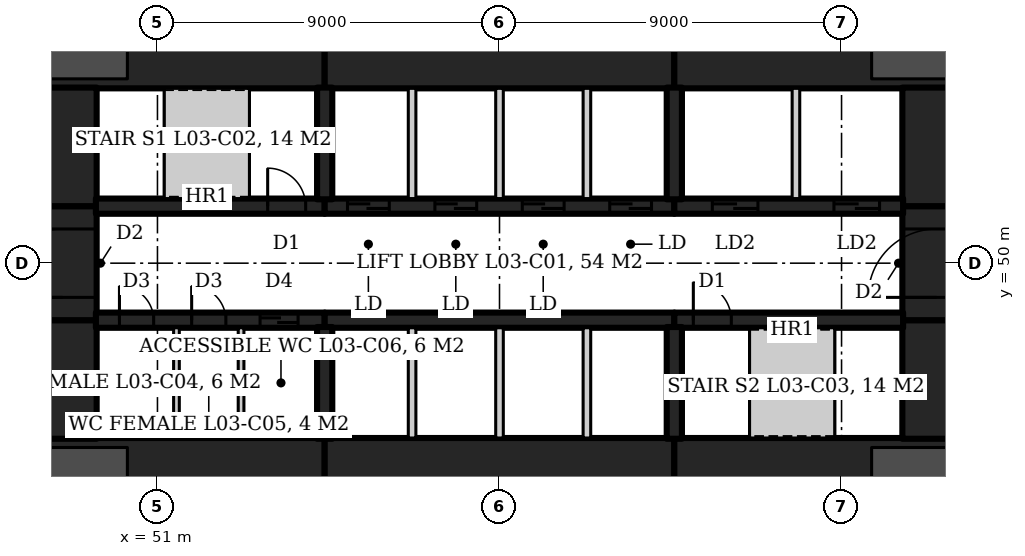
"""IFC4 building model, lengths in metres.
Left out: names, types, materials, properties, quantities, classifications, styles, units other than length and angle.
Written with IfcOpenShell. Run it as: python <this file> out.ifc"""

import sys

from ifc_helpers import new_model, si_unit, direction, frame, frame_2d, origin, origin_2d, place, context, subcontext, project, spatial, rectangle, circle, extrude, element, fill, save


model = new_model("IFC4")
c1 = context("Model", 3, precision=1e-05, world=origin(), true_north=direction((0.0, 1.0)))
c2 = subcontext(c1, "Body", "Model", "MODEL_VIEW")
j1 = project(units=[si_unit("LENGTHUNIT", "METRE"), si_unit("PLANEANGLEUNIT", "RADIAN")], contexts=[c1])
p1 = place(None, origin())
s1 = spatial("IfcSite", under=j1, at=p1, CompositionType="ELEMENT")
p2 = place(p1, origin())
s2 = spatial("IfcBuilding", under=s1, at=p2, CompositionType="ELEMENT")
p3 = place(p2, frame((0.0, 0.0, 20.0)))
s3 = spatial("IfcBuildingStorey", under=s2, at=p3, CompositionType="ELEMENT", Elevation=20.0)
for number, where, z_axis, x_axis in (
    (1, (71.691, 56.75, 0.0), (0.0, 0.0, 1.0), (1.0, 0.0, 0.0)),
    (2, (48.309, 56.75, 0.0), (0.0, 0.0, 1.0), (1.0, 0.0, 0.0)),
    (3, (48.309, 43.25, 0.0), (0.0, 0.0, 1.0), (1.0, 0.0, 0.0)),
    (4, (71.691, 43.25, 0.0), (0.0, 0.0, 1.0), (1.0, 0.0, 0.0)),
):
    element("IfcColumn", number, at=place(p3, frame(where, z_axis=z_axis, x_axis=x_axis)), inside=s3, PredefinedType="COLUMN", context=c2, shape_type="SweptSolid", body=[
        extrude(circle(Radius=1.9, at=origin_2d()), origin(), (0.0, 0.0, 1.0), 5.84),
    ])
p4 = place(p3, frame((47.6, 55.5, 0.0), z_axis=(0.0, 0.0, 1.0), x_axis=(1.0, 0.0, 0.0)))
e5 = element("IfcWall", 5, at=p4, inside=s3, PredefinedType="SHEAR", context=c2, shape_type="SweptSolid", body=[
    extrude(rectangle(XDim=7.8, YDim=1.8, at=frame_2d((3.9, 0.0))), origin(), (0.0, 0.0, 1.0), 6.0),
])
p5 = place(p3, frame((55.4, 55.5, 0.0), z_axis=(0.0, 0.0, 1.0), x_axis=(1.0, 0.0, 0.0)))
e6 = element("IfcWall", 6, at=p5, inside=s3, PredefinedType="SHEAR", context=c2, shape_type="SweptSolid", body=[
    extrude(rectangle(XDim=9.2, YDim=1.8, at=frame_2d((4.6, 0.0))), origin(), (0.0, 0.0, 1.0), 6.0),
])
for number, where, z_axis, x_axis in (
    (7, (64.6, 55.5, 0.0), (0.0, 0.0, 1.0), (1.0, 0.0, 0.0)),
    (8, (47.6, 44.5, 0.0), (0.0, 0.0, 1.0), (1.0, 0.0, 0.0)),
):
    element("IfcWall", number, at=place(p3, frame(where, z_axis=z_axis, x_axis=x_axis)), inside=s3, PredefinedType="SHEAR", context=c2, shape_type="SweptSolid", body=[
        extrude(rectangle(XDim=7.8, YDim=1.8, at=frame_2d((3.9, 0.0))), origin(), (0.0, 0.0, 1.0), 6.0),
    ])
p6 = place(p3, frame((55.4, 44.5, 0.0), z_axis=(0.0, 0.0, 1.0), x_axis=(1.0, 0.0, 0.0)))
e9 = element("IfcWall", 9, at=p6, inside=s3, PredefinedType="SHEAR", context=c2, shape_type="SweptSolid", body=[
    extrude(rectangle(XDim=9.2, YDim=1.8, at=frame_2d((4.6, 0.0))), origin(), (0.0, 0.0, 1.0), 6.0),
])
p7 = place(p3, frame((64.6, 44.5, 0.0), z_axis=(0.0, 0.0, 1.0), x_axis=(1.0, 0.0, 0.0)))
e10 = element("IfcWall", 10, at=p7, inside=s3, PredefinedType="SHEAR", context=c2, shape_type="SweptSolid", body=[
    extrude(rectangle(XDim=7.8, YDim=1.8, at=frame_2d((3.9, 0.0))), origin(), (0.0, 0.0, 1.0), 6.0),
])
p8 = place(p3, frame((71.5, 45.38, 0.0), z_axis=(0.0, 0.0, 1.0), x_axis=(0.0, 1.0, 0.0)))
e11 = element("IfcWall", 11, at=p8, inside=s3, PredefinedType="SHEAR", context=c2, shape_type="SweptSolid", body=[
    extrude(rectangle(XDim=3.12, YDim=1.8, at=frame_2d((1.56, 0.0))), origin(), (0.0, 0.0, 1.0), 6.0),
])
p9 = place(p3, frame((71.5, 48.5, 0.0), z_axis=(0.0, 0.0, 1.0), x_axis=(0.0, 1.0, 0.0)))
e12 = element("IfcWall", 12, at=p9, inside=s3, PredefinedType="SHEAR", context=c2, shape_type="SweptSolid", body=[
    extrude(rectangle(XDim=3.0, YDim=1.8, at=frame_2d((1.5, 0.0))), origin(), (0.0, 0.0, 1.0), 6.0),
])
p10 = place(p9, frame((0.6, 0.0, 0.0)))
e13 = element("IfcOpeningElement", 13, at=p10, cuts=e12, PredefinedType="OPENING", context=c2, shape_type="SweptSolid", body=[
    extrude(rectangle(XDim=1.8, YDim=2.1, at=frame_2d((0.9, 1.05))), frame((0.0, 0.91, 0.0), z_axis=(0.0, -1.0, 0.0), x_axis=(1.0, 0.0, 0.0)), (0.0, 0.0, 1.0), 1.82),
])
for number, where, z_axis, x_axis in (
    (14, (71.5, 51.5, 0.0), (0.0, 0.0, 1.0), (0.0, 1.0, 0.0)),
    (15, (48.5, 45.38, 0.0), (0.0, 0.0, 1.0), (0.0, 1.0, 0.0)),
):
    element("IfcWall", number, at=place(p3, frame(where, z_axis=z_axis, x_axis=x_axis)), inside=s3, PredefinedType="SHEAR", context=c2, shape_type="SweptSolid", body=[
        extrude(rectangle(XDim=3.12, YDim=1.8, at=frame_2d((1.56, 0.0))), origin(), (0.0, 0.0, 1.0), 6.0),
    ])
p11 = place(p3, frame((48.5, 48.5, 0.0), z_axis=(0.0, 0.0, 1.0), x_axis=(0.0, 1.0, 0.0)))
e16 = element("IfcWall", 16, at=p11, inside=s3, PredefinedType="SHEAR", context=c2, shape_type="SweptSolid", body=[
    extrude(rectangle(XDim=3.0, YDim=1.8, at=frame_2d((1.5, 0.0))), origin(), (0.0, 0.0, 1.0), 6.0),
])
p12 = place(p11, frame((0.6, 0.0, 0.0)))
e17 = element("IfcOpeningElement", 17, at=p12, cuts=e16, PredefinedType="OPENING", context=c2, shape_type="SweptSolid", body=[
    extrude(rectangle(XDim=1.8, YDim=2.1, at=frame_2d((0.9, 1.05))), frame((0.0, 0.91, 0.0), z_axis=(0.0, -1.0, 0.0), x_axis=(1.0, 0.0, 0.0)), (0.0, 0.0, 1.0), 1.82),
])
p13 = place(p3, frame((48.5, 51.5, 0.0), z_axis=(0.0, 0.0, 1.0), x_axis=(0.0, 1.0, 0.0)))
e18 = element("IfcWall", 18, at=p13, inside=s3, PredefinedType="SHEAR", context=c2, shape_type="SweptSolid", body=[
    extrude(rectangle(XDim=3.12, YDim=1.8, at=frame_2d((1.56, 0.0))), origin(), (0.0, 0.0, 1.0), 6.0),
])
p14 = place(p3, frame((49.38, 51.5, 0.0), z_axis=(0.0, 0.0, 1.0), x_axis=(1.0, 0.0, 0.0)))
e19 = element("IfcWall", 19, at=p14, inside=s3, PredefinedType="SHEAR", context=c2, shape_type="SweptSolid", body=[
    extrude(rectangle(XDim=6.02, YDim=0.4, at=frame_2d((3.01, 0.0))), origin(), (0.0, 0.0, 1.0), 6.0),
])
p15 = place(p14, frame((4.52, 0.0, 0.0)))
e20 = element("IfcOpeningElement", 20, at=p15, cuts=e19, PredefinedType="OPENING", context=c2, shape_type="SweptSolid", body=[
    extrude(rectangle(XDim=1.0, YDim=2.1, at=frame_2d((0.5, 1.05))), frame((0.0, 0.21, 0.0), z_axis=(0.0, -1.0, 0.0), x_axis=(1.0, 0.0, 0.0)), (0.0, 0.0, 1.0), 0.42),
])
p16 = place(p3, frame((55.4, 51.5, 0.0), z_axis=(0.0, 0.0, 1.0), x_axis=(1.0, 0.0, 0.0)))
e21 = element("IfcWall", 21, at=p16, inside=s3, PredefinedType="SHEAR", context=c2, shape_type="SweptSolid", body=[
    extrude(rectangle(XDim=9.2, YDim=0.4, at=frame_2d((4.6, 0.0))), origin(), (0.0, 0.0, 1.0), 6.0),
])
p17 = place(p16, frame((0.6, 0.0, 0.0)))
e22 = element("IfcOpeningElement", 22, at=p17, cuts=e21, PredefinedType="OPENING", context=c2, shape_type="SweptSolid", body=[
    extrude(rectangle(XDim=1.1, YDim=2.1, at=frame_2d((0.55, 1.05))), frame((0.0, 0.21, 0.0), z_axis=(0.0, -1.0, 0.0), x_axis=(1.0, 0.0, 0.0)), (0.0, 0.0, 1.0), 0.42),
])
p18 = place(p16, frame((2.9, 0.0, 0.0)))
e23 = element("IfcOpeningElement", 23, at=p18, cuts=e21, PredefinedType="OPENING", context=c2, shape_type="SweptSolid", body=[
    extrude(rectangle(XDim=1.1, YDim=2.1, at=frame_2d((0.55, 1.05))), frame((0.0, 0.21, 0.0), z_axis=(0.0, -1.0, 0.0), x_axis=(1.0, 0.0, 0.0)), (0.0, 0.0, 1.0), 0.42),
])
p19 = place(p16, frame((5.2, 0.0, 0.0)))
e24 = element("IfcOpeningElement", 24, at=p19, cuts=e21, PredefinedType="OPENING", context=c2, shape_type="SweptSolid", body=[
    extrude(rectangle(XDim=1.1, YDim=2.1, at=frame_2d((0.55, 1.05))), frame((0.0, 0.21, 0.0), z_axis=(0.0, -1.0, 0.0), x_axis=(1.0, 0.0, 0.0)), (0.0, 0.0, 1.0), 0.42),
])
p20 = place(p16, frame((7.5, 0.0, 0.0)))
e25 = element("IfcOpeningElement", 25, at=p20, cuts=e21, PredefinedType="OPENING", context=c2, shape_type="SweptSolid", body=[
    extrude(rectangle(XDim=1.1, YDim=2.1, at=frame_2d((0.55, 1.05))), frame((0.0, 0.21, 0.0), z_axis=(0.0, -1.0, 0.0), x_axis=(1.0, 0.0, 0.0)), (0.0, 0.0, 1.0), 0.42),
])
p21 = place(p3, frame((64.6, 51.5, 0.0), z_axis=(0.0, 0.0, 1.0), x_axis=(1.0, 0.0, 0.0)))
e26 = element("IfcWall", 26, at=p21, inside=s3, PredefinedType="SHEAR", context=c2, shape_type="SweptSolid", body=[
    extrude(rectangle(XDim=6.02, YDim=0.4, at=frame_2d((3.01, 0.0))), origin(), (0.0, 0.0, 1.0), 6.0),
])
p22 = place(p21, frame((1.0, 0.0, 0.0)))
e27 = element("IfcOpeningElement", 27, at=p22, cuts=e26, PredefinedType="OPENING", context=c2, shape_type="SweptSolid", body=[
    extrude(rectangle(XDim=1.2, YDim=2.1, at=frame_2d((0.6, 1.05))), frame((0.0, 0.21, 0.0), z_axis=(0.0, -1.0, 0.0), x_axis=(1.0, 0.0, 0.0)), (0.0, 0.0, 1.0), 0.42),
])
p23 = place(p21, frame((4.2, 0.0, 0.0)))
e28 = element("IfcOpeningElement", 28, at=p23, cuts=e26, PredefinedType="OPENING", context=c2, shape_type="SweptSolid", body=[
    extrude(rectangle(XDim=1.2, YDim=2.1, at=frame_2d((0.6, 1.05))), frame((0.0, 0.21, 0.0), z_axis=(0.0, -1.0, 0.0), x_axis=(1.0, 0.0, 0.0)), (0.0, 0.0, 1.0), 0.42),
])
p24 = place(p3, frame((49.38, 48.5, 0.0), z_axis=(0.0, 0.0, 1.0), x_axis=(1.0, 0.0, 0.0)))
e29 = element("IfcWall", 29, at=p24, inside=s3, PredefinedType="SHEAR", context=c2, shape_type="SweptSolid", body=[
    extrude(rectangle(XDim=6.02, YDim=0.4, at=frame_2d((3.01, 0.0))), origin(), (0.0, 0.0, 1.0), 6.0),
])
p25 = place(p24, frame((0.62, 0.0, 0.0)))
e30 = element("IfcOpeningElement", 30, at=p25, cuts=e29, PredefinedType="OPENING", context=c2, shape_type="SweptSolid", body=[
    extrude(rectangle(XDim=0.9, YDim=2.1, at=frame_2d((0.45, 1.05))), frame((0.0, 0.21, 0.0), z_axis=(0.0, -1.0, 0.0), x_axis=(1.0, 0.0, 0.0)), (0.0, 0.0, 1.0), 0.42),
])
p26 = place(p24, frame((2.52, 0.0, 0.0)))
e31 = element("IfcOpeningElement", 31, at=p26, cuts=e29, PredefinedType="OPENING", context=c2, shape_type="SweptSolid", body=[
    extrude(rectangle(XDim=0.9, YDim=2.1, at=frame_2d((0.45, 1.05))), frame((0.0, 0.21, 0.0), z_axis=(0.0, -1.0, 0.0), x_axis=(1.0, 0.0, 0.0)), (0.0, 0.0, 1.0), 0.42),
])
p27 = place(p24, frame((4.32, 0.0, 0.0)))
e32 = element("IfcOpeningElement", 32, at=p27, cuts=e29, PredefinedType="OPENING", context=c2, shape_type="SweptSolid", body=[
    extrude(rectangle(XDim=1.0, YDim=2.1, at=frame_2d((0.5, 1.05))), frame((0.0, 0.21, 0.0), z_axis=(0.0, -1.0, 0.0), x_axis=(1.0, 0.0, 0.0)), (0.0, 0.0, 1.0), 0.42),
])
p28 = place(p3, frame((55.4, 48.5, 0.0), z_axis=(0.0, 0.0, 1.0), x_axis=(1.0, 0.0, 0.0)))
e33 = element("IfcWall", 33, at=p28, inside=s3, PredefinedType="SHEAR", context=c2, shape_type="SweptSolid", body=[
    extrude(rectangle(XDim=9.2, YDim=0.4, at=frame_2d((4.6, 0.0))), origin(), (0.0, 0.0, 1.0), 6.0),
])
p29 = place(p3, frame((64.6, 48.5, 0.0), z_axis=(0.0, 0.0, 1.0), x_axis=(1.0, 0.0, 0.0)))
e34 = element("IfcWall", 34, at=p29, inside=s3, PredefinedType="SHEAR", context=c2, shape_type="SweptSolid", body=[
    extrude(rectangle(XDim=6.02, YDim=0.4, at=frame_2d((3.01, 0.0))), origin(), (0.0, 0.0, 1.0), 6.0),
])
p30 = place(p29, frame((0.5, 0.0, 0.0)))
e35 = element("IfcOpeningElement", 35, at=p30, cuts=e34, PredefinedType="OPENING", context=c2, shape_type="SweptSolid", body=[
    extrude(rectangle(XDim=1.0, YDim=2.1, at=frame_2d((0.5, 1.05))), frame((0.0, 0.21, 0.0), z_axis=(0.0, -1.0, 0.0), x_axis=(1.0, 0.0, 0.0)), (0.0, 0.0, 1.0), 0.42),
])
for number, where, z_axis, x_axis in (
    (36, (55.4, 51.68, 0.0), (0.0, 0.0, 1.0), (0.0, 1.0, 0.0)),
    (37, (64.6, 51.68, 0.0), (0.0, 0.0, 1.0), (0.0, 1.0, 0.0)),
    (38, (55.4, 48.32, 0.0), (0.0, 0.0, 1.0), (0.0, -1.0, 0.0)),
    (39, (64.6, 48.32, 0.0), (0.0, 0.0, 1.0), (0.0, -1.0, 0.0)),
):
    element("IfcWall", number, at=place(p3, frame(where, z_axis=z_axis, x_axis=x_axis)), inside=s3, PredefinedType="SHEAR", context=c2, shape_type="SweptSolid", body=[
        extrude(rectangle(XDim=2.94, YDim=0.4, at=frame_2d((1.47, 0.0))), origin(), (0.0, 0.0, 1.0), 6.0),
    ])
for number, where, z_axis, x_axis in (
    (40, (57.7, 51.7, 0.0), (0.0, 0.0, 1.0), (0.0, 1.0, 0.0)),
    (41, (60.0, 51.7, 0.0), (0.0, 0.0, 1.0), (0.0, 1.0, 0.0)),
    (42, (62.3, 51.7, 0.0), (0.0, 0.0, 1.0), (0.0, 1.0, 0.0)),
    (43, (57.7, 45.4, 0.0), (0.0, 0.0, 1.0), (0.0, 1.0, 0.0)),
    (44, (60.0, 45.4, 0.0), (0.0, 0.0, 1.0), (0.0, 1.0, 0.0)),
    (45, (62.3, 45.4, 0.0), (0.0, 0.0, 1.0), (0.0, 1.0, 0.0)),
    (46, (67.8, 51.7, 0.0), (0.0, 0.0, 1.0), (0.0, 1.0, 0.0)),
):
    element("IfcWall", number, at=place(p3, frame(where, z_axis=z_axis, x_axis=x_axis)), inside=s3, PredefinedType="PARTITIONING", context=c2, shape_type="SweptSolid", body=[
        extrude(rectangle(XDim=2.9, YDim=0.2, at=frame_2d((1.45, 0.0))), origin(), (0.0, 0.0, 1.0), 6.0),
    ])
for number, where, z_axis, x_axis in (
    (47, (51.5, 45.4, 0.0), (0.0, 0.0, 1.0), (0.0, 1.0, 0.0)),
    (48, (53.2, 45.4, 0.0), (0.0, 0.0, 1.0), (0.0, 1.0, 0.0)),
):
    element("IfcWall", number, at=place(p3, frame(where, z_axis=z_axis, x_axis=x_axis)), inside=s3, PredefinedType="PARTITIONING", context=c2, shape_type="SweptSolid", body=[
        extrude(rectangle(XDim=2.9, YDim=0.15, at=frame_2d((1.45, 0.0))), origin(), (0.0, 0.0, 1.0), 5.84),
    ])
p31 = place(p15, origin())
e49 = element("IfcDoor", 49, at=p31, inside=s3, OperationType="SINGLE_SWING_LEFT", PredefinedType="DOOR", context=c2, shape_type="SweptSolid", body=[
    extrude(rectangle(XDim=1.0, YDim=2.1, at=frame_2d((0.5, 1.05))), frame((0.0, 0.025, 0.0), z_axis=(0.0, -1.0, 0.0), x_axis=(1.0, 0.0, 0.0)), (0.0, 0.0, 1.0), 0.05),
])
fill(e20, e49)
p32 = place(p30, origin())
e50 = element("IfcDoor", 50, at=p32, inside=s3, OperationType="SINGLE_SWING_LEFT", PredefinedType="DOOR", context=c2, shape_type="SweptSolid", body=[
    extrude(rectangle(XDim=1.0, YDim=2.1, at=frame_2d((0.5, 1.05))), frame((0.0, 0.025, 0.0), z_axis=(0.0, -1.0, 0.0), x_axis=(1.0, 0.0, 0.0)), (0.0, 0.0, 1.0), 0.05),
])
fill(e35, e50)
p33 = place(p22, origin())
e51 = element("IfcDoor", 51, at=p33, inside=s3, OperationType="SLIDING_TO_LEFT", PredefinedType="DOOR", context=c2, shape_type="SweptSolid", body=[
    extrude(rectangle(XDim=1.2, YDim=2.1, at=frame_2d((0.6, 1.05))), frame((0.0, 0.025, 0.0), z_axis=(0.0, -1.0, 0.0), x_axis=(1.0, 0.0, 0.0)), (0.0, 0.0, 1.0), 0.05),
])
fill(e27, e51)
p34 = place(p23, origin())
e52 = element("IfcDoor", 52, at=p34, inside=s3, OperationType="SLIDING_TO_LEFT", PredefinedType="DOOR", context=c2, shape_type="SweptSolid", body=[
    extrude(rectangle(XDim=1.2, YDim=2.1, at=frame_2d((0.6, 1.05))), frame((0.0, 0.025, 0.0), z_axis=(0.0, -1.0, 0.0), x_axis=(1.0, 0.0, 0.0)), (0.0, 0.0, 1.0), 0.05),
])
fill(e28, e52)
p35 = place(p17, origin())
e53 = element("IfcDoor", 53, at=p35, inside=s3, OperationType="SLIDING_TO_LEFT", PredefinedType="DOOR", context=c2, shape_type="SweptSolid", body=[
    extrude(rectangle(XDim=1.1, YDim=2.1, at=frame_2d((0.55, 1.05))), frame((0.0, 0.025, 0.0), z_axis=(0.0, -1.0, 0.0), x_axis=(1.0, 0.0, 0.0)), (0.0, 0.0, 1.0), 0.05),
])
fill(e22, e53)
p36 = place(p18, origin())
e54 = element("IfcDoor", 54, at=p36, inside=s3, OperationType="SLIDING_TO_LEFT", PredefinedType="DOOR", context=c2, shape_type="SweptSolid", body=[
    extrude(rectangle(XDim=1.1, YDim=2.1, at=frame_2d((0.55, 1.05))), frame((0.0, 0.025, 0.0), z_axis=(0.0, -1.0, 0.0), x_axis=(1.0, 0.0, 0.0)), (0.0, 0.0, 1.0), 0.05),
])
fill(e23, e54)
p37 = place(p19, origin())
e55 = element("IfcDoor", 55, at=p37, inside=s3, OperationType="SLIDING_TO_LEFT", PredefinedType="DOOR", context=c2, shape_type="SweptSolid", body=[
    extrude(rectangle(XDim=1.1, YDim=2.1, at=frame_2d((0.55, 1.05))), frame((0.0, 0.025, 0.0), z_axis=(0.0, -1.0, 0.0), x_axis=(1.0, 0.0, 0.0)), (0.0, 0.0, 1.0), 0.05),
])
fill(e24, e55)
p38 = place(p20, origin())
e56 = element("IfcDoor", 56, at=p38, inside=s3, OperationType="SLIDING_TO_LEFT", PredefinedType="DOOR", context=c2, shape_type="SweptSolid", body=[
    extrude(rectangle(XDim=1.1, YDim=2.1, at=frame_2d((0.55, 1.05))), frame((0.0, 0.025, 0.0), z_axis=(0.0, -1.0, 0.0), x_axis=(1.0, 0.0, 0.0)), (0.0, 0.0, 1.0), 0.05),
])
fill(e25, e56)
p39 = place(p25, origin())
e57 = element("IfcDoor", 57, at=p39, inside=s3, OperationType="SINGLE_SWING_RIGHT", PredefinedType="DOOR", context=c2, shape_type="SweptSolid", body=[
    extrude(rectangle(XDim=0.9, YDim=2.1, at=frame_2d((0.45, 1.05))), frame((0.0, 0.025, 0.0), z_axis=(0.0, -1.0, 0.0), x_axis=(1.0, 0.0, 0.0)), (0.0, 0.0, 1.0), 0.05),
])
fill(e30, e57)
p40 = place(p26, origin())
e58 = element("IfcDoor", 58, at=p40, inside=s3, OperationType="SINGLE_SWING_RIGHT", PredefinedType="DOOR", context=c2, shape_type="SweptSolid", body=[
    extrude(rectangle(XDim=0.9, YDim=2.1, at=frame_2d((0.45, 1.05))), frame((0.0, 0.025, 0.0), z_axis=(0.0, -1.0, 0.0), x_axis=(1.0, 0.0, 0.0)), (0.0, 0.0, 1.0), 0.05),
])
fill(e31, e58)
p41 = place(p27, origin())
e59 = element("IfcDoor", 59, at=p41, inside=s3, OperationType="SLIDING_TO_LEFT", PredefinedType="DOOR", context=c2, shape_type="SweptSolid", body=[
    extrude(rectangle(XDim=1.0, YDim=2.1, at=frame_2d((0.5, 1.05))), frame((0.0, 0.025, 0.0), z_axis=(0.0, -1.0, 0.0), x_axis=(1.0, 0.0, 0.0)), (0.0, 0.0, 1.0), 0.05),
])
fill(e32, e59)
p42 = place(p10, origin())
e60 = element("IfcDoor", 60, at=p42, inside=s3, OperationType="DOUBLE_DOOR_DOUBLE_SWING", PredefinedType="DOOR", context=c2, shape_type="SweptSolid", body=[
    extrude(rectangle(XDim=1.8, YDim=2.1, at=frame_2d((0.9, 1.05))), frame((0.0, 0.025, 0.0), z_axis=(0.0, -1.0, 0.0), x_axis=(1.0, 0.0, 0.0)), (0.0, 0.0, 1.0), 0.05),
])
fill(e13, e60)
p43 = place(p12, origin())
e61 = element("IfcDoor", 61, at=p43, inside=s3, OperationType="DOUBLE_DOOR_DOUBLE_SWING", PredefinedType="DOOR", context=c2, shape_type="SweptSolid", body=[
    extrude(rectangle(XDim=1.8, YDim=2.1, at=frame_2d((0.9, 1.05))), frame((0.0, 0.025, 0.0), z_axis=(0.0, -1.0, 0.0), x_axis=(1.0, 0.0, 0.0)), (0.0, 0.0, 1.0), 0.05),
])
fill(e17, e61)
save(model, sys.argv[1])
